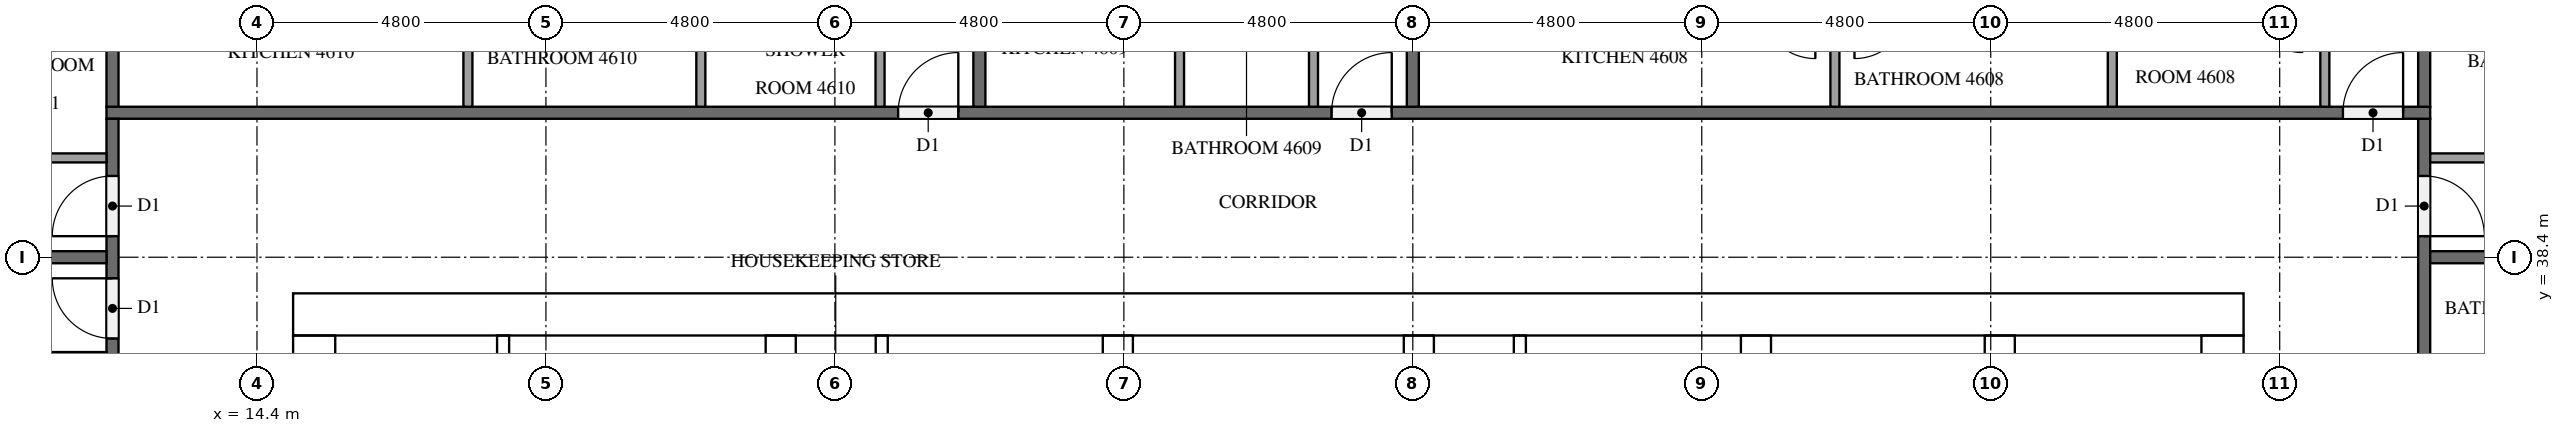
"""IFC4 building model, lengths in metres.
Left out: names, types, materials, properties, quantities, classifications, styles, units other than length and angle.
Written with IfcOpenShell. Run it as: python <this file> out.ifc"""

import sys

from ifc_helpers import new_model, si_unit, direction, frame, frame_2d, origin, place, context, subcontext, project, spatial, rectangle, extrude, element, fill, save


model = new_model("IFC4")
c1 = context("Model", 3, precision=1e-05, world=origin(), true_north=direction((0.0, 1.0)))
c2 = subcontext(c1, "Body", "Model", "MODEL_VIEW")
j1 = project(units=[si_unit("LENGTHUNIT", "METRE"), si_unit("PLANEANGLEUNIT", "RADIAN")], contexts=[c1])
p1 = place(None, origin())
s1 = spatial("IfcSite", under=j1, at=p1, CompositionType="ELEMENT")
p2 = place(p1, origin())
s2 = spatial("IfcBuilding", under=s1, at=p2, CompositionType="ELEMENT")
p3 = place(p2, frame((0.0, 0.0, 178.9)))
s3 = spatial("IfcBuildingStorey", under=s2, at=p3, CompositionType="ELEMENT", Elevation=178.9)
p4 = place(p3, frame((15.0, 37.45, 0.0), z_axis=(0.0, 0.0, 1.0), x_axis=(1.0, 0.0, 0.0)))
e1 = element("IfcWall", 1, at=p4, inside=s3, PredefinedType="SHEAR", context=c2, shape_type="SweptSolid", body=[
    extrude(rectangle(XDim=32.4, YDim=0.7, at=frame_2d((16.2, 0.0))), origin(), (0.0, 0.0, 1.0), 3.2),
])
p5 = place(p4, frame((15.3, 0.0, 0.0)))
e2 = element("IfcOpeningElement", 2, at=p5, cuts=e1, PredefinedType="OPENING", context=c2, shape_type="SweptSolid", body=[
    extrude(rectangle(XDim=1.8, YDim=2.1, at=frame_2d((0.9, 1.05))), frame((0.0, 0.36, 0.0), z_axis=(0.0, -1.0, 0.0), x_axis=(1.0, 0.0, 0.0)), (0.0, 0.0, 1.0), 0.72),
])
p6 = place(p4, frame((1.544, 0.0, 0.0)))
e3 = element("IfcOpeningElement", 3, at=p6, cuts=e1, PredefinedType="OPENING", context=c2, shape_type="SweptSolid", body=[
    extrude(rectangle(XDim=1.0, YDim=2.1, at=frame_2d((0.5, 1.05))), frame((0.0, 0.36, 0.0), z_axis=(0.0, -1.0, 0.0), x_axis=(1.0, 0.0, 0.0)), (0.0, 0.0, 1.0), 0.72),
])
p7 = place(p4, frame((5.219, 0.0, 0.0)))
e4 = element("IfcOpeningElement", 4, at=p7, cuts=e1, PredefinedType="OPENING", context=c2, shape_type="SweptSolid", body=[
    extrude(rectangle(XDim=1.0, YDim=2.1, at=frame_2d((0.5, 1.05))), frame((0.0, 0.36, 0.0), z_axis=(0.0, -1.0, 0.0), x_axis=(1.0, 0.0, 0.0)), (0.0, 0.0, 1.0), 0.72),
])
p8 = place(p3, frame((15.35, 15.7, 0.0), z_axis=(0.0, 0.0, 1.0), x_axis=(0.0, 1.0, 0.0)))
e5 = element("IfcWall", 5, at=p8, inside=s3, PredefinedType="SHEAR", context=c2, shape_type="SweptSolid", body=[
    extrude(rectangle(XDim=21.4, YDim=0.7, at=frame_2d((10.7, 0.0))), origin(), (0.0, 0.0, 1.0), 3.2),
])
p9 = place(p8, frame((5.06, 0.0, 0.0)))
e6 = element("IfcOpeningElement", 6, at=p9, cuts=e5, PredefinedType="OPENING", context=c2, shape_type="SweptSolid", body=[
    extrude(rectangle(XDim=1.2, YDim=2.1, at=frame_2d((0.6, 1.05))), frame((0.0, 0.36, 0.0), z_axis=(0.0, -1.0, 0.0), x_axis=(1.0, 0.0, 0.0)), (0.0, 0.0, 1.0), 0.72),
])
p10 = place(p3, frame((47.05, 15.7, 0.0), z_axis=(0.0, 0.0, 1.0), x_axis=(0.0, 1.0, 0.0)))
e7 = element("IfcWall", 7, at=p10, inside=s3, PredefinedType="SHEAR", context=c2, shape_type="SweptSolid", body=[
    extrude(rectangle(XDim=21.4, YDim=0.7, at=frame_2d((10.7, 0.0))), origin(), (0.0, 0.0, 1.0), 3.2),
])
p11 = place(p10, frame((10.4, 0.0, 0.0)))
e8 = element("IfcOpeningElement", 8, at=p11, cuts=e7, PredefinedType="OPENING", context=c2, shape_type="SweptSolid", body=[
    extrude(rectangle(XDim=1.2, YDim=2.1, at=frame_2d((0.6, 1.05))), frame((0.0, 0.36, 0.0), z_axis=(0.0, -1.0, 0.0), x_axis=(1.0, 0.0, 0.0)), (0.0, 0.0, 1.0), 0.72),
])
p12 = place(p3, frame((23.1, 15.7, 0.0), z_axis=(0.0, 0.0, 1.0), x_axis=(0.0, 1.0, 0.0)))
e9 = element("IfcWall", 9, at=p12, inside=s3, PredefinedType="SHEAR", context=c2, shape_type="SweptSolid", body=[
    extrude(rectangle(XDim=21.4, YDim=0.5, at=frame_2d((10.7, 0.0))), origin(), (0.0, 0.0, 1.0), 3.2),
])
p13 = place(p3, frame((39.3, 27.75, 0.0), z_axis=(0.0, 0.0, 1.0), x_axis=(0.0, 1.0, 0.0)))
e10 = element("IfcWall", 10, at=p13, inside=s3, PredefinedType="SHEAR", context=c2, shape_type="SweptSolid", body=[
    extrude(rectangle(XDim=9.35, YDim=0.5, at=frame_2d((4.675, 0.0))), origin(), (0.0, 0.0, 1.0), 3.2),
])
p14 = place(p3, frame((43.35, 27.75, 0.0), z_axis=(0.0, 0.0, 1.0), x_axis=(0.0, 1.0, 0.0)))
e11 = element("IfcWall", 11, at=p14, inside=s3, PredefinedType="SHEAR", context=c2, shape_type="SweptSolid", body=[
    extrude(rectangle(XDim=9.35, YDim=0.5, at=frame_2d((4.675, 0.0))), origin(), (0.0, 0.0, 1.0), 3.2),
])
p15 = place(p14, frame((7.65, 0.0, 0.0)))
e12 = element("IfcOpeningElement", 12, at=p15, cuts=e11, PredefinedType="OPENING", context=c2, shape_type="SweptSolid", body=[
    extrude(rectangle(XDim=1.2, YDim=2.1, at=frame_2d((0.6, 1.05))), frame((0.0, 0.26, 0.0), z_axis=(0.0, -1.0, 0.0), x_axis=(1.0, 0.0, 0.0)), (0.0, 0.0, 1.0), 0.52),
])
for number, where, z_axis, x_axis in (
    (13, (28.7, 33.8, 0.0), (0.0, 0.0, 1.0), (0.0, 1.0, 0.0)),
    (14, (33.7, 33.8, 0.0), (0.0, 0.0, 1.0), (0.0, 1.0, 0.0)),
):
    element("IfcWall", number, at=place(p3, frame(where, z_axis=z_axis, x_axis=x_axis)), inside=s3, PredefinedType="SHEAR", context=c2, shape_type="SweptSolid", body=[
        extrude(rectangle(XDim=3.3, YDim=0.5, at=frame_2d((1.65, 0.0))), origin(), (0.0, 0.0, 1.0), 3.2),
    ])
p16 = place(p3, frame((18.489, 31.5, 0.0), z_axis=(0.0, 0.0, 1.0), x_axis=(0.0, 1.0, 0.0)))
e15 = element("IfcWall", 15, at=p16, inside=s3, PredefinedType="PARTITIONING", context=c2, shape_type="SweptSolid", body=[
    extrude(rectangle(XDim=5.6, YDim=0.2, at=frame_2d((2.8, 0.0))), origin(), (0.0, 0.0, 1.0), 3.2),
])
for number, where, z_axis, x_axis in (
    (16, (24.778, 33.8, 0.0), (0.0, 0.0, 1.0), (0.0, 1.0, 0.0)),
    (17, (35.378, 33.8, 0.0), (0.0, 0.0, 1.0), (0.0, 1.0, 0.0)),
):
    element("IfcWall", number, at=place(p3, frame(where, z_axis=z_axis, x_axis=x_axis)), inside=s3, PredefinedType="PARTITIONING", context=c2, shape_type="SweptSolid", body=[
        extrude(rectangle(XDim=3.3, YDim=0.2, at=frame_2d((1.65, 0.0))), origin(), (0.0, 0.0, 1.0), 3.2),
    ])
p17 = place(p3, frame((50.4, 40.7, 0.0), z_axis=(0.0, 0.0, 1.0), x_axis=(0.0, -1.0, 0.0)))
e18 = element("IfcWall", 18, at=p17, inside=s3, PredefinedType="PARTITIONING", context=c2, shape_type="SweptSolid", body=[
    extrude(rectangle(XDim=28.6, YDim=0.2, at=frame_2d((14.3, 0.0))), origin(), (0.0, 0.0, 1.0), 3.2),
])
p18 = place(p17, frame((27.3, 0.0, 0.0)))
e19 = element("IfcOpeningElement", 19, at=p18, cuts=e18, PredefinedType="OPENING", context=c2, shape_type="SweptSolid", body=[
    extrude(rectangle(XDim=1.1, YDim=2.1, at=frame_2d((0.55, 1.05))), frame((0.0, 0.11, 0.0), z_axis=(0.0, -1.0, 0.0), x_axis=(1.0, 0.0, 0.0)), (0.0, 0.0, 1.0), 0.22),
])
p19 = place(p17, frame((8.15, 0.0, 0.0)))
e20 = element("IfcOpeningElement", 20, at=p19, cuts=e18, PredefinedType="OPENING", context=c2, shape_type="SweptSolid", body=[
    extrude(rectangle(XDim=1.0, YDim=2.1, at=frame_2d((0.5, 1.05))), frame((0.0, 0.11, 0.0), z_axis=(0.0, -1.0, 0.0), x_axis=(1.0, 0.0, 0.0)), (0.0, 0.0, 1.0), 0.22),
])
p20 = place(p17, frame((0.95, 0.0, 0.0)))
e21 = element("IfcOpeningElement", 21, at=p20, cuts=e18, PredefinedType="OPENING", context=c2, shape_type="SweptSolid", body=[
    extrude(rectangle(XDim=1.0, YDim=2.1, at=frame_2d((0.5, 1.05))), frame((0.0, 0.11, 0.0), z_axis=(0.0, -1.0, 0.0), x_axis=(1.0, 0.0, 0.0)), (0.0, 0.0, 1.0), 0.22),
])
p21 = place(p3, frame((11.9, 40.8, 0.0), z_axis=(0.0, 0.0, 1.0), x_axis=(1.0, 0.0, 0.0)))
e22 = element("IfcWall", 22, at=p21, inside=s3, PredefinedType="PARTITIONING", context=c2, shape_type="SweptSolid", body=[
    extrude(rectangle(XDim=38.6, YDim=0.2, at=frame_2d((19.3, 0.0))), origin(), (0.0, 0.0, 1.0), 3.2),
])
p22 = place(p21, frame((37.15, 0.0, 0.0)))
e23 = element("IfcOpeningElement", 23, at=p22, cuts=e22, PredefinedType="OPENING", context=c2, shape_type="SweptSolid", body=[
    extrude(rectangle(XDim=1.0, YDim=2.1, at=frame_2d((0.5, 1.05))), frame((0.0, 0.11, 0.0), z_axis=(0.0, -1.0, 0.0), x_axis=(1.0, 0.0, 0.0)), (0.0, 0.0, 1.0), 0.22),
])
p23 = place(p21, frame((20.35, 0.0, 0.0)))
e24 = element("IfcOpeningElement", 24, at=p23, cuts=e22, PredefinedType="OPENING", context=c2, shape_type="SweptSolid", body=[
    extrude(rectangle(XDim=1.0, YDim=2.1, at=frame_2d((0.5, 1.05))), frame((0.0, 0.11, 0.0), z_axis=(0.0, -1.0, 0.0), x_axis=(1.0, 0.0, 0.0)), (0.0, 0.0, 1.0), 0.22),
])
p24 = place(p21, frame((13.15, 0.0, 0.0)))
e25 = element("IfcOpeningElement", 25, at=p24, cuts=e22, PredefinedType="OPENING", context=c2, shape_type="SweptSolid", body=[
    extrude(rectangle(XDim=1.0, YDim=2.1, at=frame_2d((0.5, 1.05))), frame((0.0, 0.11, 0.0), z_axis=(0.0, -1.0, 0.0), x_axis=(1.0, 0.0, 0.0)), (0.0, 0.0, 1.0), 0.22),
])
p25 = place(p3, frame((12.0, 12.1, 0.0), z_axis=(0.0, 0.0, 1.0), x_axis=(0.0, 1.0, 0.0)))
e26 = element("IfcWall", 26, at=p25, inside=s3, PredefinedType="PARTITIONING", context=c2, shape_type="SweptSolid", body=[
    extrude(rectangle(XDim=28.6, YDim=0.2, at=frame_2d((14.3, 0.0))), origin(), (0.0, 0.0, 1.0), 3.2),
])
p26 = place(p25, frame((26.65, 0.0, 0.0)))
e27 = element("IfcOpeningElement", 27, at=p26, cuts=e26, PredefinedType="OPENING", context=c2, shape_type="SweptSolid", body=[
    extrude(rectangle(XDim=1.0, YDim=2.1, at=frame_2d((0.5, 1.05))), frame((0.0, 0.11, 0.0), z_axis=(0.0, -1.0, 0.0), x_axis=(1.0, 0.0, 0.0)), (0.0, 0.0, 1.0), 0.22),
])
p27 = place(p25, frame((24.95, 0.0, 0.0)))
e28 = element("IfcOpeningElement", 28, at=p27, cuts=e26, PredefinedType="OPENING", context=c2, shape_type="SweptSolid", body=[
    extrude(rectangle(XDim=1.0, YDim=2.1, at=frame_2d((0.5, 1.05))), frame((0.0, 0.11, 0.0), z_axis=(0.0, -1.0, 0.0), x_axis=(1.0, 0.0, 0.0)), (0.0, 0.0, 1.0), 0.22),
])
p28 = place(p25, frame((12.95, 0.0, 0.0)))
e29 = element("IfcOpeningElement", 29, at=p28, cuts=e26, PredefinedType="OPENING", context=c2, shape_type="SweptSolid", body=[
    extrude(rectangle(XDim=1.0, YDim=2.1, at=frame_2d((0.5, 1.05))), frame((0.0, 0.11, 0.0), z_axis=(0.0, -1.0, 0.0), x_axis=(1.0, 0.0, 0.0)), (0.0, 0.0, 1.0), 0.22),
])
p29 = place(p3, frame((50.5, 38.4, 0.0), z_axis=(0.0, 0.0, 1.0), x_axis=(1.0, 0.0, 0.0)))
e30 = element("IfcWall", 30, at=p29, inside=s3, PredefinedType="PARTITIONING", context=c2, shape_type="SweptSolid", body=[
    extrude(rectangle(XDim=11.8, YDim=0.2, at=frame_2d((5.9, 0.0))), origin(), (0.0, 0.0, 1.0), 3.2),
])
for number, where, z_axis, x_axis in (
    (31, (50.4, 40.9, 0.0), (0.0, 0.0, 1.0), (0.0, 1.0, 0.0)),
    (32, (33.6, 47.9, 0.0), (0.0, 0.0, 1.0), (0.0, -1.0, 0.0)),
    (33, (26.4, 47.9, 0.0), (0.0, 0.0, 1.0), (0.0, -1.0, 0.0)),
    (34, (12.0, 47.9, 0.0), (0.0, 0.0, 1.0), (0.0, -1.0, 0.0)),
    (35, (4.9, 38.4, 0.0), (0.0, 0.0, 1.0), (1.0, 0.0, 0.0)),
):
    element("IfcWall", number, at=place(p3, frame(where, z_axis=z_axis, x_axis=x_axis)), inside=s3, PredefinedType="PARTITIONING", context=c2, shape_type="SweptSolid", body=[
        extrude(rectangle(XDim=7.0, YDim=0.2, at=frame_2d((3.5, 0.0))), origin(), (0.0, 0.0, 1.0), 3.2),
    ])
p30 = place(p3, frame((50.5, 40.05, 0.0), z_axis=(0.0, 0.0, 1.0), x_axis=(1.0, 0.0, 0.0)))
e36 = element("IfcWall", 36, at=p30, inside=s3, PredefinedType="PARTITIONING", context=c2, shape_type="SweptSolid", body=[
    extrude(rectangle(XDim=3.875, YDim=0.15, at=frame_2d((1.938, 0.0))), origin(), (0.0, 0.0, 1.0), 3.2),
])
for number, where, z_axis, x_axis in (
    (37, (45.219, 40.9, 0.0), (0.0, 0.0, 1.0), (0.0, 1.0, 0.0)),
    (38, (40.612, 40.9, 0.0), (0.0, 0.0, 1.0), (0.0, 1.0, 0.0)),
):
    element("IfcWall", number, at=place(p3, frame(where, z_axis=z_axis, x_axis=x_axis)), inside=s3, PredefinedType="PARTITIONING", context=c2, shape_type="SweptSolid", body=[
        extrude(rectangle(XDim=1.625, YDim=0.15, at=frame_2d((0.812, 0.0))), origin(), (0.0, 0.0, 1.0), 3.2),
    ])
p31 = place(p3, frame((48.75, 40.9, 0.0), z_axis=(0.0, 0.0, 1.0), x_axis=(0.0, 1.0, 0.0)))
e39 = element("IfcWall", 39, at=p31, inside=s3, PredefinedType="PARTITIONING", context=c2, shape_type="SweptSolid", body=[
    extrude(rectangle(XDim=1.775, YDim=0.15, at=frame_2d((0.888, 0.0))), origin(), (0.0, 0.0, 1.0), 3.2),
])
p32 = place(p3, frame((29.725, 40.9, 0.0), z_axis=(0.0, 0.0, 1.0), x_axis=(0.0, 1.0, 0.0)))
e40 = element("IfcWall", 40, at=p32, inside=s3, PredefinedType="PARTITIONING", context=c2, shape_type="SweptSolid", body=[
    extrude(rectangle(XDim=2.075, YDim=0.15, at=frame_2d((1.038, 0.0))), origin(), (0.0, 0.0, 1.0), 3.2),
])
p33 = place(p3, frame((31.95, 40.9, 0.0), z_axis=(0.0, 0.0, 1.0), x_axis=(0.0, 1.0, 0.0)))
e41 = element("IfcWall", 41, at=p33, inside=s3, PredefinedType="PARTITIONING", context=c2, shape_type="SweptSolid", body=[
    extrude(rectangle(XDim=2.225, YDim=0.15, at=frame_2d((1.113, 0.0))), origin(), (0.0, 0.0, 1.0), 3.2),
])
for number, where, z_axis, x_axis in (
    (42, (21.773, 40.9, 0.0), (0.0, 0.0, 1.0), (0.0, 1.0, 0.0)),
    (43, (17.904, 40.9, 0.0), (0.0, 0.0, 1.0), (0.0, 1.0, 0.0)),
):
    element("IfcWall", number, at=place(p3, frame(where, z_axis=z_axis, x_axis=x_axis)), inside=s3, PredefinedType="PARTITIONING", context=c2, shape_type="SweptSolid", body=[
        extrude(rectangle(XDim=1.775, YDim=0.15, at=frame_2d((0.888, 0.0))), origin(), (0.0, 0.0, 1.0), 3.2),
    ])
p34 = place(p3, frame((24.75, 40.9, 0.0), z_axis=(0.0, 0.0, 1.0), x_axis=(0.0, 1.0, 0.0)))
e44 = element("IfcWall", 44, at=p34, inside=s3, PredefinedType="PARTITIONING", context=c2, shape_type="SweptSolid", body=[
    extrude(rectangle(XDim=1.925, YDim=0.15, at=frame_2d((0.962, 0.0))), origin(), (0.0, 0.0, 1.0), 3.2),
])
p35 = place(p3, frame((11.9, 40.05, 0.0), z_axis=(0.0, 0.0, 1.0), x_axis=(-1.0, 0.0, 0.0)))
e45 = element("IfcWall", 45, at=p35, inside=s3, PredefinedType="PARTITIONING", context=c2, shape_type="SweptSolid", body=[
    extrude(rectangle(XDim=2.375, YDim=0.15, at=frame_2d((1.188, 0.0))), origin(), (0.0, 0.0, 1.0), 3.2),
])
p36 = place(p3, frame((11.9, 36.75, 0.0), z_axis=(0.0, 0.0, 1.0), x_axis=(-1.0, 0.0, 0.0)))
e46 = element("IfcWall", 46, at=p36, inside=s3, PredefinedType="PARTITIONING", context=c2, shape_type="SweptSolid", body=[
    extrude(rectangle(XDim=1.925, YDim=0.15, at=frame_2d((0.962, 0.0))), origin(), (0.0, 0.0, 1.0), 3.2),
])
p37 = place(p5, origin())
e47 = element("IfcDoor", 47, at=p37, inside=s3, OperationType="DOUBLE_DOOR_SINGLE_SWING", PredefinedType="DOOR", context=c2, shape_type="SweptSolid", body=[
    extrude(rectangle(XDim=1.8, YDim=2.1, at=frame_2d((0.9, 1.05))), frame((0.0, 0.025, 0.0), z_axis=(0.0, -1.0, 0.0), x_axis=(1.0, 0.0, 0.0)), (0.0, 0.0, 1.0), 0.05),
])
fill(e2, e47)
p38 = place(p6, origin())
e48 = element("IfcDoor", 48, at=p38, inside=s3, OperationType="SINGLE_SWING_LEFT", PredefinedType="DOOR", context=c2, shape_type="SweptSolid", body=[
    extrude(rectangle(XDim=1.0, YDim=2.1, at=frame_2d((0.5, 1.05))), frame((0.0, 0.025, 0.0), z_axis=(0.0, -1.0, 0.0), x_axis=(1.0, 0.0, 0.0)), (0.0, 0.0, 1.0), 0.05),
])
fill(e3, e48)
p39 = place(p7, origin())
e49 = element("IfcDoor", 49, at=p39, inside=s3, OperationType="SINGLE_SWING_RIGHT", PredefinedType="DOOR", context=c2, shape_type="SweptSolid", body=[
    extrude(rectangle(XDim=1.0, YDim=2.1, at=frame_2d((0.5, 1.05))), frame((0.0, 0.025, 0.0), z_axis=(0.0, -1.0, 0.0), x_axis=(1.0, 0.0, 0.0)), (0.0, 0.0, 1.0), 0.05),
])
fill(e4, e49)
p40 = place(p20, origin())
e50 = element("IfcDoor", 50, at=p40, inside=s3, OperationType="SINGLE_SWING_RIGHT", PredefinedType="DOOR", context=c2, shape_type="SweptSolid", body=[
    extrude(rectangle(XDim=1.0, YDim=2.1, at=frame_2d((0.5, 1.05))), frame((0.0, 0.025, 0.0), z_axis=(0.0, -1.0, 0.0), x_axis=(1.0, 0.0, 0.0)), (0.0, 0.0, 1.0), 0.05),
])
fill(e21, e50)
p41 = place(p22, origin())
e51 = element("IfcDoor", 51, at=p41, inside=s3, OperationType="SINGLE_SWING_RIGHT", PredefinedType="DOOR", context=c2, shape_type="SweptSolid", body=[
    extrude(rectangle(XDim=1.0, YDim=2.1, at=frame_2d((0.5, 1.05))), frame((0.0, 0.025, 0.0), z_axis=(0.0, -1.0, 0.0), x_axis=(1.0, 0.0, 0.0)), (0.0, 0.0, 1.0), 0.05),
])
fill(e23, e51)
p42 = place(p23, origin())
e52 = element("IfcDoor", 52, at=p42, inside=s3, OperationType="SINGLE_SWING_RIGHT", PredefinedType="DOOR", context=c2, shape_type="SweptSolid", body=[
    extrude(rectangle(XDim=1.0, YDim=2.1, at=frame_2d((0.5, 1.05))), frame((0.0, 0.025, 0.0), z_axis=(0.0, -1.0, 0.0), x_axis=(1.0, 0.0, 0.0)), (0.0, 0.0, 1.0), 0.05),
])
fill(e24, e52)
p43 = place(p24, origin())
e53 = element("IfcDoor", 53, at=p43, inside=s3, OperationType="SINGLE_SWING_RIGHT", PredefinedType="DOOR", context=c2, shape_type="SweptSolid", body=[
    extrude(rectangle(XDim=1.0, YDim=2.1, at=frame_2d((0.5, 1.05))), frame((0.0, 0.025, 0.0), z_axis=(0.0, -1.0, 0.0), x_axis=(1.0, 0.0, 0.0)), (0.0, 0.0, 1.0), 0.05),
])
fill(e25, e53)
p44 = place(p26, origin())
e54 = element("IfcDoor", 54, at=p44, inside=s3, OperationType="SINGLE_SWING_LEFT", PredefinedType="DOOR", context=c2, shape_type="SweptSolid", body=[
    extrude(rectangle(XDim=1.0, YDim=2.1, at=frame_2d((0.5, 1.05))), frame((0.0, 0.025, 0.0), z_axis=(0.0, -1.0, 0.0), x_axis=(1.0, 0.0, 0.0)), (0.0, 0.0, 1.0), 0.05),
])
fill(e27, e54)
p45 = place(p27, origin())
e55 = element("IfcDoor", 55, at=p45, inside=s3, OperationType="SINGLE_SWING_RIGHT", PredefinedType="DOOR", context=c2, shape_type="SweptSolid", body=[
    extrude(rectangle(XDim=1.0, YDim=2.1, at=frame_2d((0.5, 1.05))), frame((0.0, 0.025, 0.0), z_axis=(0.0, -1.0, 0.0), x_axis=(1.0, 0.0, 0.0)), (0.0, 0.0, 1.0), 0.05),
])
fill(e28, e55)
save(model, sys.argv[1])
